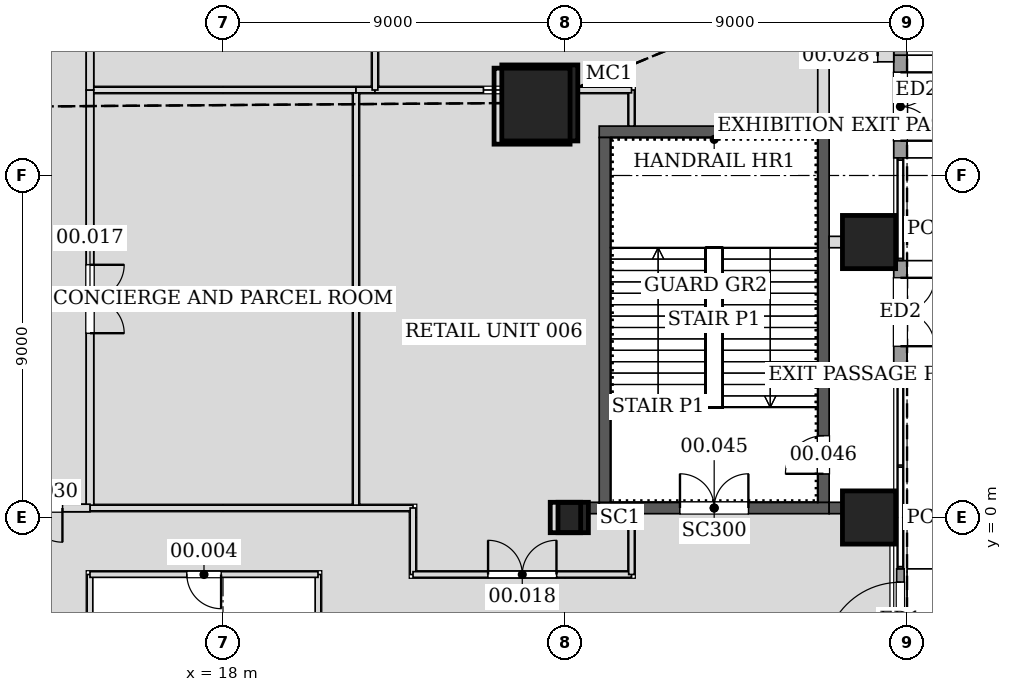
"""IFC4 building model, lengths in metres.
Left out: names, types, materials, properties, quantities, classifications, styles, units other than length and angle.
Written with IfcOpenShell. Run it as: python <this file> out.ifc"""

import sys

from ifc_helpers import new_model, si_unit, direction, frame, frame_2d, origin, origin_2d, place, context, subcontext, project, spatial, rectangle, hollow_rectangle, extrude, element, fill, save


model = new_model("IFC4")
c1 = context("Model", 3, precision=1e-05, world=origin(), true_north=direction((0.0, 1.0)))
c2 = subcontext(c1, "Body", "Model", "MODEL_VIEW")
j1 = project(units=[si_unit("LENGTHUNIT", "METRE"), si_unit("PLANEANGLEUNIT", "RADIAN")], contexts=[c1])
p1 = place(None, origin())
s1 = spatial("IfcSite", under=j1, at=p1, CompositionType="ELEMENT")
p2 = place(p1, origin())
s2 = spatial("IfcBuilding", under=s1, at=p2, CompositionType="ELEMENT")
p3 = place(p2, origin())
s3 = spatial("IfcBuildingStorey", under=s2, at=p3, CompositionType="ELEMENT", Elevation=0.0)
p4 = place(p3, frame((26.336, 10.909, 0.0), z_axis=(-0.028266568786, -0.011726897842, 0.999531630793), x_axis=(0.383199413132, -0.923665637433, 0.0)))
e1 = element("IfcColumn", 1, at=p4, inside=s3, PredefinedType="COLUMN", context=c2, shape_type="SweptSolid", body=[
    extrude(hollow_rectangle(XDim=2.0, YDim=2.0, WallThickness=0.09, at=origin_2d()), origin(), (0.0, 0.0, 1.0), 7.203),
])
p5 = place(p3, frame((27.215, 0.0, 0.0), z_axis=(-0.028268512598, 0.0, 0.999600365744), x_axis=(0.0, -1.0, 0.0)))
e2 = element("IfcColumn", 2, at=p5, inside=s3, PredefinedType="COLUMN", context=c2, shape_type="SweptSolid", body=[
    extrude(hollow_rectangle(XDim=0.8, YDim=0.8, WallThickness=0.05, at=origin_2d()), origin(), (0.0, 0.0, 1.0), 7.203),
])
for number, where, z_axis, x_axis in (
    (3, (35.0, 0.0, 0.0), (0.0, 0.0, 1.0), (1.0, 0.0, 0.0)),
    (4, (35.0, 7.249, 0.0), (0.0, 0.0, 1.0), (1.0, 0.0, 0.0)),
):
    element("IfcColumn", number, at=place(p3, frame(where, z_axis=z_axis, x_axis=x_axis)), inside=s3, PredefinedType="COLUMN", context=c2, shape_type="SweptSolid", body=[
        extrude(rectangle(XDim=1.4, YDim=1.4, at=origin_2d()), origin(), (0.0, 0.0, 1.0), 7.2),
    ])
p6 = place(p3, frame((27.9, 0.25, 0.0), z_axis=(0.0, 0.0, 1.0), x_axis=(1.0, 0.0, 0.0)))
e5 = element("IfcWall", 5, at=p6, inside=s3, PredefinedType="SOLIDWALL", context=c2, shape_type="SweptSolid", body=[
    extrude(rectangle(XDim=6.05, YDim=0.3, at=frame_2d((3.025, 0.0))), origin(), (0.0, 0.0, 1.0), 7.2),
])
p7 = place(p6, frame((2.125, 0.0, 0.0)))
e6 = element("IfcOpeningElement", 6, at=p7, cuts=e5, PredefinedType="OPENING", context=c2, shape_type="SweptSolid", body=[
    extrude(rectangle(XDim=1.8, YDim=2.1, at=frame_2d((0.9, 1.05))), frame((0.0, 0.16, 0.0), z_axis=(0.0, -1.0, 0.0), x_axis=(1.0, 0.0, 0.0)), (0.0, 0.0, 1.0), 0.32),
])
p8 = place(p3, frame((27.9, 0.25, 0.0), z_axis=(0.0, 0.0, 1.0), x_axis=(-1.0, 0.0, 0.0)))
e7 = element("IfcWall", 7, at=p8, inside=s3, PredefinedType="SOLIDWALL", context=c2, shape_type="SweptSolid", body=[
    extrude(rectangle(XDim=0.285, YDim=0.3, at=frame_2d((0.143, 0.0))), origin(), (0.0, 0.0, 1.0), 6.544),
])
p9 = place(p3, frame((33.95, 0.25, 0.0), z_axis=(0.0, 0.0, 1.0), x_axis=(1.0, 0.0, 0.0)))
e8 = element("IfcWall", 8, at=p9, inside=s3, PredefinedType="SOLIDWALL", context=c2, shape_type="SweptSolid", body=[
    extrude(rectangle(XDim=0.35, YDim=0.3, at=frame_2d((0.175, 0.0))), origin(), (0.0, 0.0, 1.0), 6.544),
])
p10 = place(p3, frame((33.95, 10.15, 0.0), z_axis=(0.0, 0.0, 1.0), x_axis=(-1.0, 0.0, 0.0)))
e9 = element("IfcWall", 9, at=p10, inside=s3, PredefinedType="SOLIDWALL", context=c2, shape_type="SweptSolid", body=[
    extrude(rectangle(XDim=6.05, YDim=0.3, at=frame_2d((3.025, 0.0))), origin(), (0.0, 0.0, 1.0), 7.2),
])
p11 = place(p3, frame((28.05, 10.0, 0.0), z_axis=(0.0, 0.0, 1.0), x_axis=(0.0, -1.0, 0.0)))
e10 = element("IfcWall", 10, at=p11, inside=s3, PredefinedType="SOLIDWALL", context=c2, shape_type="SweptSolid", body=[
    extrude(rectangle(XDim=9.6, YDim=0.3, at=frame_2d((4.8, 0.0))), origin(), (0.0, 0.0, 1.0), 7.2),
])
p12 = place(p3, frame((33.8, 0.4, 0.0), z_axis=(0.0, 0.0, 1.0), x_axis=(0.0, 1.0, 0.0)))
e11 = element("IfcWall", 11, at=p12, inside=s3, PredefinedType="SOLIDWALL", context=c2, shape_type="SweptSolid", body=[
    extrude(rectangle(XDim=9.6, YDim=0.3, at=frame_2d((4.8, 0.0))), origin(), (0.0, 0.0, 1.0), 7.2),
])
p13 = place(p12, frame((0.75, 0.0, 0.0)))
e12 = element("IfcOpeningElement", 12, at=p13, cuts=e11, PredefinedType="OPENING", context=c2, shape_type="SweptSolid", body=[
    extrude(rectangle(XDim=1.0, YDim=2.1, at=frame_2d((0.5, 1.05))), frame((0.0, 0.16, 0.0), z_axis=(0.0, -1.0, 0.0), x_axis=(1.0, 0.0, 0.0)), (0.0, 0.0, 1.0), 0.32),
])
p14 = place(p3, frame((35.825, -4.055, 0.0), z_axis=(0.0, 0.0, 1.0), x_axis=(0.0, 1.0, 0.0)))
e13 = element("IfcWall", 13, at=p14, inside=s3, PredefinedType="SOLIDWALL", context=c2, shape_type="SweptSolid", body=[
    extrude(rectangle(XDim=2.704, YDim=0.2, at=frame_2d((1.352, 0.0))), origin(), (0.0, 0.0, 1.0), 6.9),
])
p15 = place(p14, frame((0.352, 0.0, 0.0)))
e14 = element("IfcOpeningElement", 14, at=p15, cuts=e13, PredefinedType="OPENING", context=c2, shape_type="SweptSolid", body=[
    extrude(rectangle(XDim=2.0, YDim=3.0, at=frame_2d((1.0, 1.5))), frame((0.0, 0.11, 0.0), z_axis=(0.0, -1.0, 0.0), x_axis=(1.0, 0.0, 0.0)), (0.0, 0.0, 1.0), 0.22),
])
p16 = place(p3, frame((35.825, 4.055, 0.0), z_axis=(0.0, 0.0, 1.0), x_axis=(0.0, 1.0, 0.0)))
e15 = element("IfcWall", 15, at=p16, inside=s3, PredefinedType="SOLIDWALL", context=c2, shape_type="SweptSolid", body=[
    extrude(rectangle(XDim=2.704, YDim=0.35, at=frame_2d((1.352, 0.0))), origin(), (0.0, 0.0, 1.0), 6.9),
])
p17 = place(p16, frame((0.452, 0.0, 0.0)))
e16 = element("IfcOpeningElement", 16, at=p17, cuts=e15, PredefinedType="OPENING", context=c2, shape_type="SweptSolid", body=[
    extrude(rectangle(XDim=1.8, YDim=2.4, at=frame_2d((0.9, 1.2))), frame((0.0, 0.185, 0.0), z_axis=(0.0, -1.0, 0.0), x_axis=(1.0, 0.0, 0.0)), (0.0, 0.0, 1.0), 0.37),
])
p18 = place(p3, frame((35.825, 9.463, 0.0), z_axis=(0.0, 0.0, 1.0), x_axis=(0.0, 1.0, 0.0)))
e17 = element("IfcWall", 17, at=p18, inside=s3, PredefinedType="SOLIDWALL", context=c2, shape_type="SweptSolid", body=[
    extrude(rectangle(XDim=2.704, YDim=0.35, at=frame_2d((1.352, 0.0))), origin(), (0.0, 0.0, 1.0), 6.9),
])
p19 = place(p18, frame((0.452, 0.0, 0.0)))
e18 = element("IfcOpeningElement", 18, at=p19, cuts=e17, PredefinedType="OPENING", context=c2, shape_type="SweptSolid", body=[
    extrude(rectangle(XDim=1.8, YDim=2.4, at=frame_2d((0.9, 1.2))), frame((0.0, 0.185, 0.0), z_axis=(0.0, -1.0, 0.0), x_axis=(1.0, 0.0, 0.0)), (0.0, 0.0, 1.0), 0.37),
])
p20 = place(p3, frame((35.825, 12.167, 0.0), z_axis=(0.0, 0.0, 1.0), x_axis=(0.0, 1.0, 0.0)))
e19 = element("IfcWall", 19, at=p20, inside=s3, PredefinedType="SOLIDWALL", context=c2, shape_type="SweptSolid", body=[
    extrude(rectangle(XDim=2.745, YDim=0.35, at=frame_2d((1.373, 0.0))), origin(), (0.0, 0.0, 1.0), 6.9),
])
p21 = place(p3, frame((34.281, 7.249, 0.0), z_axis=(0.0, 0.0, 1.0), x_axis=(-1.0, 0.0, 0.0)))
e20 = element("IfcWall", 20, at=p21, inside=s3, PredefinedType="PARTITIONING", context=c2, shape_type="SweptSolid", body=[
    extrude(rectangle(XDim=0.332, YDim=0.3, at=frame_2d((0.166, 0.0))), origin(), (0.0, 0.0, 1.0), 6.291),
])
p22 = place(p3, frame((35.65, 12.141, 0.0), z_axis=(0.0, 0.0, 1.0), x_axis=(-1.0, 0.0, 0.0)))
e21 = element("IfcWall", 21, at=p22, inside=s3, PredefinedType="PARTITIONING", context=c2, shape_type="SweptSolid", body=[
    extrude(rectangle(XDim=1.85, YDim=0.3, at=frame_2d((0.925, 0.0))), origin(), (0.0, 0.0, 1.0), 5.93),
])
p23 = place(p22, frame((0.425, 0.0, 0.0)))
e22 = element("IfcOpeningElement", 22, at=p23, cuts=e21, PredefinedType="OPENING", context=c2, shape_type="SweptSolid", body=[
    extrude(rectangle(XDim=1.0, YDim=2.1, at=frame_2d((0.5, 1.05))), frame((0.0, 0.16, 0.0), z_axis=(0.0, -1.0, 0.0), x_axis=(1.0, 0.0, 0.0)), (0.0, 0.0, 1.0), 0.32),
])
p24 = place(p3, frame((33.8, 12.141, 0.0), z_axis=(0.0, 0.0, 1.0), x_axis=(0.0, -1.0, 0.0)))
e23 = element("IfcWall", 23, at=p24, inside=s3, PredefinedType="PARTITIONING", context=c2, shape_type="SweptSolid", body=[
    extrude(rectangle(XDim=1.842, YDim=0.3, at=frame_2d((0.921, 0.0))), origin(), (0.0, 0.0, 1.0), 6.9),
])
p25 = place(p3, frame((20.5, -10.5, 0.0), z_axis=(0.0, 0.0, 1.0), x_axis=(0.0, 1.0, 0.0)))
e24 = element("IfcWall", 24, at=p25, inside=s3, PredefinedType="PARTITIONING", context=c2, shape_type="SweptSolid", body=[
    extrude(rectangle(XDim=9.0, YDim=0.15, at=frame_2d((4.5, 0.0))), origin(), (0.0, 0.0, 1.0), 6.9),
])
p26 = place(p3, frame((14.5, -8.0, 0.0), z_axis=(0.0, 0.0, 1.0), x_axis=(0.0, 1.0, 0.0)))
e25 = element("IfcWall", 25, at=p26, inside=s3, PredefinedType="PARTITIONING", context=c2, shape_type="SweptSolid", body=[
    extrude(rectangle(XDim=6.5, YDim=0.15, at=frame_2d((3.25, 0.0))), origin(), (0.0, 0.0, 1.0), 6.9),
])
p27 = place(p26, frame((0.8, 0.0, 0.0)))
e26 = element("IfcOpeningElement", 26, at=p27, cuts=e25, PredefinedType="OPENING", context=c2, shape_type="SweptSolid", body=[
    extrude(rectangle(XDim=0.9, YDim=2.1, at=frame_2d((0.45, 1.05))), frame((0.0, 0.085, 0.0), z_axis=(0.0, -1.0, 0.0), x_axis=(1.0, 0.0, 0.0)), (0.0, 0.0, 1.0), 0.17),
])
p28 = place(p26, frame((3.1, 0.0, 0.0)))
e27 = element("IfcOpeningElement", 27, at=p28, cuts=e25, PredefinedType="OPENING", context=c2, shape_type="SweptSolid", body=[
    extrude(rectangle(XDim=1.0, YDim=2.1, at=frame_2d((0.5, 1.05))), frame((0.0, 0.085, 0.0), z_axis=(0.0, -1.0, 0.0), x_axis=(1.0, 0.0, 0.0)), (0.0, 0.0, 1.0), 0.17),
])
p29 = place(p3, frame((20.5, -1.5, 0.0), z_axis=(0.0, 0.0, 1.0), x_axis=(-1.0, 0.0, 0.0)))
e28 = element("IfcWall", 28, at=p29, inside=s3, PredefinedType="PARTITIONING", context=c2, shape_type="SweptSolid", body=[
    extrude(rectangle(XDim=6.0, YDim=0.15, at=frame_2d((3.0, 0.0))), origin(), (0.0, 0.0, 1.0), 6.283),
])
p30 = place(p29, frame((2.55, 0.0, 0.0)))
e29 = element("IfcOpeningElement", 29, at=p30, cuts=e28, PredefinedType="OPENING", context=c2, shape_type="SweptSolid", body=[
    extrude(rectangle(XDim=0.9, YDim=2.1, at=frame_2d((0.45, 1.05))), frame((0.0, 0.085, 0.0), z_axis=(0.0, -1.0, 0.0), x_axis=(1.0, 0.0, 0.0)), (0.0, 0.0, 1.0), 0.17),
])
p31 = place(p3, frame((21.5, 0.25, 0.0), z_axis=(0.0, 0.0, 1.0), x_axis=(0.0, 1.0, 0.0)))
e30 = element("IfcWall", 30, at=p31, inside=s3, PredefinedType="PARTITIONING", context=c2, shape_type="SweptSolid", body=[
    extrude(rectangle(XDim=11.0, YDim=0.15, at=frame_2d((5.5, 0.0))), origin(), (0.0, 0.0, 1.0), 5.59),
])
p32 = place(p3, frame((21.5, 11.25, 0.0), z_axis=(0.0, 0.0, 1.0), x_axis=(-1.0, 0.0, 0.0)))
e31 = element("IfcWall", 31, at=p32, inside=s3, PredefinedType="PARTITIONING", context=c2, shape_type="SweptSolid", body=[
    extrude(rectangle(XDim=7.0, YDim=0.15, at=frame_2d((3.5, 0.0))), origin(), (0.0, 0.0, 1.0), 6.44),
])
p33 = place(p3, frame((14.5, 11.25, 0.0), z_axis=(0.0, 0.0, 1.0), x_axis=(0.0, -1.0, 0.0)))
e32 = element("IfcWall", 32, at=p33, inside=s3, PredefinedType="PARTITIONING", context=c2, shape_type="SweptSolid", body=[
    extrude(rectangle(XDim=11.0, YDim=0.2, at=frame_2d((5.5, 0.0))), origin(), (0.0, 0.0, 1.0), 5.59),
])
p34 = place(p33, frame((4.6, 0.0, 0.0)))
e33 = element("IfcOpeningElement", 33, at=p34, cuts=e32, PredefinedType="OPENING", context=c2, shape_type="SweptSolid", body=[
    extrude(rectangle(XDim=1.8, YDim=2.4, at=frame_2d((0.9, 1.2))), frame((0.0, 0.11, 0.0), z_axis=(0.0, -1.0, 0.0), x_axis=(1.0, 0.0, 0.0)), (0.0, 0.0, 1.0), 0.22),
])
p35 = place(p3, frame((14.5, 0.25, 0.0), z_axis=(0.0, 0.0, 1.0), x_axis=(1.0, 0.0, 0.0)))
e34 = element("IfcWall", 34, at=p35, inside=s3, PredefinedType="PARTITIONING", context=c2, shape_type="SweptSolid", body=[
    extrude(rectangle(XDim=8.5, YDim=0.15, at=frame_2d((4.25, 0.0))), origin(), (0.0, 0.0, 1.0), 5.59),
])
p36 = place(p3, frame((22.001, 11.25, 0.0), z_axis=(0.0, 0.0, 1.0), x_axis=(-1.0, 0.0, 0.0)))
e35 = element("IfcWall", 35, at=p36, inside=s3, PredefinedType="PARTITIONING", context=c2, shape_type="SweptSolid", body=[
    extrude(rectangle(XDim=0.501, YDim=0.15, at=frame_2d((0.25, 0.0))), origin(), (0.0, 0.0, 1.0), 6.9),
])
p37 = place(p3, frame((28.75, 10.3, 0.0), z_axis=(0.0, 0.0, 1.0), x_axis=(0.0, 1.0, 0.0)))
e36 = element("IfcWall", 36, at=p37, inside=s3, PredefinedType="PARTITIONING", context=c2, shape_type="SweptSolid", body=[
    extrude(rectangle(XDim=0.95, YDim=0.15, at=frame_2d((0.475, 0.0))), origin(), (0.0, 0.0, 1.0), 6.364),
])
p38 = place(p3, frame((28.75, 11.25, 0.0), z_axis=(0.0, 0.0, 1.0), x_axis=(-1.0, 0.0, 0.0)))
e37 = element("IfcWall", 37, at=p38, inside=s3, PredefinedType="PARTITIONING", context=c2, shape_type="SweptSolid", body=[
    extrude(rectangle(XDim=1.451, YDim=0.15, at=frame_2d((0.726, 0.0))), origin(), (0.0, 0.0, 1.0), 6.207),
])
p39 = place(p3, frame((24.853, 11.25, 0.0), z_axis=(0.0, 0.0, 1.0), x_axis=(-1.0, 0.0, 0.0)))
e38 = element("IfcWall", 38, at=p39, inside=s3, PredefinedType="PARTITIONING", context=c2, shape_type="SweptSolid", body=[
    extrude(rectangle(XDim=2.854, YDim=0.15, at=frame_2d((1.427, 0.0))), origin(), (0.0, 0.0, 1.0), 6.049),
])
p40 = place(p3, frame((23.0, 0.25, 0.0), z_axis=(0.0, 0.0, 1.0), x_axis=(0.0, -1.0, 0.0)))
e39 = element("IfcWall", 39, at=p40, inside=s3, PredefinedType="PARTITIONING", context=c2, shape_type="SweptSolid", body=[
    extrude(rectangle(XDim=1.75, YDim=0.15, at=frame_2d((0.875, 0.0))), origin(), (0.0, 0.0, 1.0), 5.59),
])
p41 = place(p3, frame((23.0, -1.5, 0.0), z_axis=(0.0, 0.0, 1.0), x_axis=(1.0, 0.0, 0.0)))
e40 = element("IfcWall", 40, at=p41, inside=s3, PredefinedType="PARTITIONING", context=c2, shape_type="SweptSolid", body=[
    extrude(rectangle(XDim=5.75, YDim=0.15, at=frame_2d((2.875, 0.0))), origin(), (0.0, 0.0, 1.0), 5.879),
])
p42 = place(p41, frame((1.975, 0.0, 0.0)))
e41 = element("IfcOpeningElement", 41, at=p42, cuts=e40, PredefinedType="OPENING", context=c2, shape_type="SweptSolid", body=[
    extrude(rectangle(XDim=1.8, YDim=2.4, at=frame_2d((0.9, 1.2))), frame((0.0, 0.085, 0.0), z_axis=(0.0, -1.0, 0.0), x_axis=(1.0, 0.0, 0.0)), (0.0, 0.0, 1.0), 0.17),
])
p43 = place(p3, frame((28.75, -1.5, 0.0), z_axis=(0.0, 0.0, 1.0), x_axis=(0.0, 1.0, 0.0)))
e42 = element("IfcWall", 42, at=p43, inside=s3, PredefinedType="PARTITIONING", context=c2, shape_type="SweptSolid", body=[
    extrude(rectangle(XDim=1.601, YDim=0.15, at=frame_2d((0.8, 0.0))), origin(), (0.0, 0.0, 1.0), 6.9),
])
p44 = place(p3, frame((22.0, 11.25, 0.0), z_axis=(0.0, 0.0, 1.0), x_axis=(0.0, 1.0, 0.0)))
e43 = element("IfcWall", 43, at=p44, inside=s3, PredefinedType="PARTITIONING", context=c2, shape_type="SweptSolid", body=[
    extrude(rectangle(XDim=5.75, YDim=0.15, at=frame_2d((2.875, 0.0))), origin(), (0.0, 0.0, 1.0), 5.879),
])
p45 = place(p44, frame((2.375, 0.0, 0.0)))
e44 = element("IfcOpeningElement", 44, at=p45, cuts=e43, PredefinedType="OPENING", context=c2, shape_type="SweptSolid", body=[
    extrude(rectangle(XDim=1.0, YDim=2.1, at=frame_2d((0.5, 1.05))), frame((0.0, 0.085, 0.0), z_axis=(0.0, -1.0, 0.0), x_axis=(1.0, 0.0, 0.0)), (0.0, 0.0, 1.0), 0.17),
])
p46 = place(p3, frame((14.5, 17.0, 0.0), z_axis=(0.0, 0.0, 1.0), x_axis=(0.0, -1.0, 0.0)))
e45 = element("IfcWall", 45, at=p46, inside=s3, PredefinedType="PARTITIONING", context=c2, shape_type="SweptSolid", body=[
    extrude(rectangle(XDim=5.75, YDim=0.2, at=frame_2d((2.875, 0.0))), origin(), (0.0, 0.0, 1.0), 5.79),
])
p47 = place(p3, frame((11.25, 0.25, 0.0), z_axis=(0.0, 0.0, 1.0), x_axis=(1.0, 0.0, 0.0)))
e46 = element("IfcWall", 46, at=p47, inside=s3, PredefinedType="PARTITIONING", context=c2, shape_type="SweptSolid", body=[
    extrude(rectangle(XDim=3.25, YDim=0.2, at=frame_2d((1.625, 0.0))), origin(), (0.0, 0.0, 1.0), 5.59),
])
p48 = place(p47, frame((0.725, 0.0, 0.0)))
e47 = element("IfcOpeningElement", 47, at=p48, cuts=e46, PredefinedType="OPENING", context=c2, shape_type="SweptSolid", body=[
    extrude(rectangle(XDim=1.8, YDim=2.4, at=frame_2d((0.9, 1.2))), frame((0.0, 0.11, 0.0), z_axis=(0.0, -1.0, 0.0), x_axis=(1.0, 0.0, 0.0)), (0.0, 0.0, 1.0), 0.22),
])
p49 = place(p15, origin())
e48 = element("IfcDoor", 48, at=p49, inside=s3, OperationType="SINGLE_SWING_LEFT", PredefinedType="DOOR", context=c2, shape_type="SweptSolid", body=[
    extrude(rectangle(XDim=2.0, YDim=3.0, at=frame_2d((1.0, 1.5))), frame((0.0, 0.025, 0.0), z_axis=(0.0, -1.0, 0.0), x_axis=(1.0, 0.0, 0.0)), (0.0, 0.0, 1.0), 0.05),
])
fill(e14, e48)
p50 = place(p17, frame((1.8, 0.0, 0.0), z_axis=(0.0, 0.0, 1.0), x_axis=(-1.0, 0.0, 0.0)))
e49 = element("IfcDoor", 49, at=p50, inside=s3, OperationType="DOUBLE_DOOR_SINGLE_SWING", PredefinedType="DOOR", context=c2, shape_type="SweptSolid", body=[
    extrude(rectangle(XDim=1.8, YDim=2.4, at=frame_2d((0.9, 1.2))), frame((0.0, 0.025, 0.0), z_axis=(0.0, -1.0, 0.0), x_axis=(1.0, 0.0, 0.0)), (0.0, 0.0, 1.0), 0.05),
])
fill(e16, e49)
p51 = place(p19, frame((1.8, 0.0, 0.0), z_axis=(0.0, 0.0, 1.0), x_axis=(-1.0, 0.0, 0.0)))
e50 = element("IfcDoor", 50, at=p51, inside=s3, OperationType="DOUBLE_DOOR_SINGLE_SWING", PredefinedType="DOOR", context=c2, shape_type="SweptSolid", body=[
    extrude(rectangle(XDim=1.8, YDim=2.4, at=frame_2d((0.9, 1.2))), frame((0.0, 0.025, 0.0), z_axis=(0.0, -1.0, 0.0), x_axis=(1.0, 0.0, 0.0)), (0.0, 0.0, 1.0), 0.05),
])
fill(e18, e50)
p52 = place(p30, origin())
e51 = element("IfcDoor", 51, at=p52, inside=s3, OperationType="SINGLE_SWING_LEFT", PredefinedType="DOOR", context=c2, shape_type="SweptSolid", body=[
    extrude(rectangle(XDim=0.9, YDim=2.1, at=frame_2d((0.45, 1.05))), frame((0.0, 0.025, 0.0), z_axis=(0.0, -1.0, 0.0), x_axis=(1.0, 0.0, 0.0)), (0.0, 0.0, 1.0), 0.05),
])
fill(e29, e51)
p53 = place(p34, origin())
e52 = element("IfcDoor", 52, at=p53, inside=s3, OperationType="DOUBLE_DOOR_SINGLE_SWING", PredefinedType="DOOR", context=c2, shape_type="SweptSolid", body=[
    extrude(rectangle(XDim=1.8, YDim=2.4, at=frame_2d((0.9, 1.2))), frame((0.0, 0.025, 0.0), z_axis=(0.0, -1.0, 0.0), x_axis=(1.0, 0.0, 0.0)), (0.0, 0.0, 1.0), 0.05),
])
fill(e33, e52)
p54 = place(p42, origin())
e53 = element("IfcDoor", 53, at=p54, inside=s3, OperationType="DOUBLE_DOOR_SINGLE_SWING", PredefinedType="DOOR", context=c2, shape_type="SweptSolid", body=[
    extrude(rectangle(XDim=1.8, YDim=2.4, at=frame_2d((0.9, 1.2))), frame((0.0, 0.025, 0.0), z_axis=(0.0, -1.0, 0.0), x_axis=(1.0, 0.0, 0.0)), (0.0, 0.0, 1.0), 0.05),
])
fill(e41, e53)
p55 = place(p23, frame((1.0, 0.0, 0.0), z_axis=(0.0, 0.0, 1.0), x_axis=(-1.0, 0.0, 0.0)))
e54 = element("IfcDoor", 54, at=p55, inside=s3, OperationType="SINGLE_SWING_RIGHT", PredefinedType="DOOR", context=c2, shape_type="SweptSolid", body=[
    extrude(rectangle(XDim=1.0, YDim=2.1, at=frame_2d((0.5, 1.05))), frame((0.0, 0.025, 0.0), z_axis=(0.0, -1.0, 0.0), x_axis=(1.0, 0.0, 0.0)), (0.0, 0.0, 1.0), 0.05),
])
fill(e22, e54)
p56 = place(p48, frame((1.8, 0.0, 0.0), z_axis=(0.0, 0.0, 1.0), x_axis=(-1.0, 0.0, 0.0)))
e55 = element("IfcDoor", 55, at=p56, inside=s3, OperationType="DOUBLE_DOOR_SINGLE_SWING", PredefinedType="DOOR", context=c2, shape_type="SweptSolid", body=[
    extrude(rectangle(XDim=1.8, YDim=2.4, at=frame_2d((0.9, 1.2))), frame((0.0, 0.025, 0.0), z_axis=(0.0, -1.0, 0.0), x_axis=(1.0, 0.0, 0.0)), (0.0, 0.0, 1.0), 0.05),
])
fill(e47, e55)
p57 = place(p7, origin())
e56 = element("IfcDoor", 56, at=p57, inside=s3, OperationType="DOUBLE_DOOR_SINGLE_SWING", PredefinedType="DOOR", context=c2, shape_type="SweptSolid", body=[
    extrude(rectangle(XDim=1.8, YDim=2.1, at=frame_2d((0.9, 1.05))), frame((0.0, 0.025, 0.0), z_axis=(0.0, -1.0, 0.0), x_axis=(1.0, 0.0, 0.0)), (0.0, 0.0, 1.0), 0.05),
])
fill(e6, e56)
p58 = place(p13, origin())
e57 = element("IfcDoor", 57, at=p58, inside=s3, OperationType="SINGLE_SWING_LEFT", PredefinedType="DOOR", context=c2, shape_type="SweptSolid", body=[
    extrude(rectangle(XDim=1.0, YDim=2.1, at=frame_2d((0.5, 1.05))), frame((0.0, 0.025, 0.0), z_axis=(0.0, -1.0, 0.0), x_axis=(1.0, 0.0, 0.0)), (0.0, 0.0, 1.0), 0.05),
])
fill(e12, e57)
save(model, sys.argv[1])
